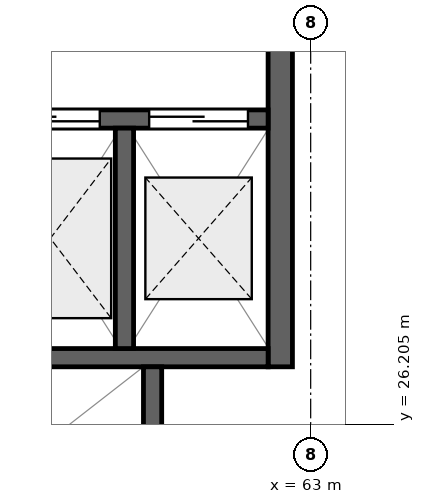
"""IFC4 building model, lengths in metres.
Left out: names, types, materials, properties, quantities, classifications, styles, units other than length and angle.
Written with IfcOpenShell. Run it as: python <this file> out.ifc"""

import sys

from ifc_helpers import new_model, si_unit, direction, frame, frame_2d, origin, place, context, subcontext, project, spatial, rectangle, extrude, element, fill, save


model = new_model("IFC4")
c1 = context("Model", 3, precision=1e-05, world=origin(), true_north=direction((0.0, 1.0)))
c2 = subcontext(c1, "Body", "Model", "MODEL_VIEW")
j1 = project(units=[si_unit("LENGTHUNIT", "METRE"), si_unit("PLANEANGLEUNIT", "RADIAN")], contexts=[c1])
p1 = place(None, origin())
s1 = spatial("IfcSite", under=j1, at=p1, CompositionType="ELEMENT")
p2 = place(p1, origin())
s2 = spatial("IfcBuilding", under=s1, at=p2, CompositionType="ELEMENT")
p3 = place(p2, frame((0.0, 0.0, 5.4)))
s3 = spatial("IfcBuildingStorey", under=s2, at=p3, CompositionType="ELEMENT", Elevation=5.4)
p4 = place(p3, frame((62.6, 26.96, 0.0), z_axis=(0.0, 0.0, 1.0), x_axis=(0.0, 1.0, 0.0)))
e1 = element("IfcWall", 1, at=p4, inside=s3, PredefinedType="SHEAR", context=c2, shape_type="SweptSolid", body=[
    extrude(rectangle(XDim=9.04, YDim=0.32, at=frame_2d((4.52, 0.0))), origin(), (0.0, 0.0, 1.0), 4.16),
])
p5 = place(p3, frame((58.54, 30.22, 0.0), z_axis=(0.0, 0.0, 1.0), x_axis=(1.0, 0.0, 0.0)))
e2 = element("IfcWall", 2, at=p5, inside=s3, PredefinedType="SHEAR", context=c2, shape_type="SweptSolid", body=[
    extrude(rectangle(XDim=3.9, YDim=0.24, at=frame_2d((1.95, 0.0))), origin(), (0.0, 0.0, 1.0), 4.31),
])
p6 = place(p5, frame((0.385, 0.0, 0.0)))
e3 = element("IfcOpeningElement", 3, at=p6, cuts=e2, PredefinedType="OPENING", context=c2, shape_type="SweptSolid", body=[
    extrude(rectangle(XDim=1.3, YDim=2.2, at=frame_2d((0.65, 1.1))), frame((0.0, 0.135, 0.0), z_axis=(0.0, -1.0, 0.0), x_axis=(1.0, 0.0, 0.0)), (0.0, 0.0, 1.0), 0.27),
])
p7 = place(p5, frame((2.335, 0.0, 0.0)))
e4 = element("IfcOpeningElement", 4, at=p7, cuts=e2, PredefinedType="OPENING", context=c2, shape_type="SweptSolid", body=[
    extrude(rectangle(XDim=1.3, YDim=2.2, at=frame_2d((0.65, 1.1))), frame((0.0, 0.135, 0.0), z_axis=(0.0, -1.0, 0.0), x_axis=(1.0, 0.0, 0.0)), (0.0, 0.0, 1.0), 0.27),
])
p8 = place(p3, frame((58.54, 27.08, 0.0), z_axis=(0.0, 0.0, 1.0), x_axis=(1.0, 0.0, 0.0)))
e5 = element("IfcWall", 5, at=p8, inside=s3, PredefinedType="SHEAR", context=c2, shape_type="SweptSolid", body=[
    extrude(rectangle(XDim=3.9, YDim=0.24, at=frame_2d((1.95, 0.0))), origin(), (0.0, 0.0, 1.0), 4.31),
])
p9 = place(p3, frame((60.55, 27.2, 0.0), z_axis=(0.0, 0.0, 1.0), x_axis=(0.0, 1.0, 0.0)))
e6 = element("IfcWall", 6, at=p9, inside=s3, PredefinedType="SHEAR", context=c2, shape_type="SweptSolid", body=[
    extrude(rectangle(XDim=2.9, YDim=0.24, at=frame_2d((1.45, 0.0))), origin(), (0.0, 0.0, 1.0), 4.31),
])
p10 = place(p3, frame((60.92, 24.96, 0.0), z_axis=(0.0, 0.0, 1.0), x_axis=(0.0, 1.0, 0.0)))
e7 = element("IfcWall", 7, at=p10, inside=s3, PredefinedType="SHEAR", context=c2, shape_type="SweptSolid", body=[
    extrude(rectangle(XDim=2.0, YDim=0.24, at=frame_2d((1.0, 0.0))), origin(), (0.0, 0.0, 1.0), 4.31),
])
p11 = place(p6, origin())
e8 = element("IfcDoor", 8, at=p11, inside=s3, OperationType="DOUBLE_DOOR_SLIDING", PredefinedType="DOOR", context=c2, shape_type="SweptSolid", body=[
    extrude(rectangle(XDim=1.3, YDim=2.2, at=frame_2d((0.65, 1.1))), frame((0.0, 0.025, 0.0), z_axis=(0.0, -1.0, 0.0), x_axis=(1.0, 0.0, 0.0)), (0.0, 0.0, 1.0), 0.05),
])
fill(e3, e8)
p12 = place(p7, origin())
e9 = element("IfcDoor", 9, at=p12, inside=s3, OperationType="DOUBLE_DOOR_SLIDING", PredefinedType="DOOR", context=c2, shape_type="SweptSolid", body=[
    extrude(rectangle(XDim=1.3, YDim=2.2, at=frame_2d((0.65, 1.1))), frame((0.0, 0.025, 0.0), z_axis=(0.0, -1.0, 0.0), x_axis=(1.0, 0.0, 0.0)), (0.0, 0.0, 1.0), 0.05),
])
fill(e4, e9)
save(model, sys.argv[1])
